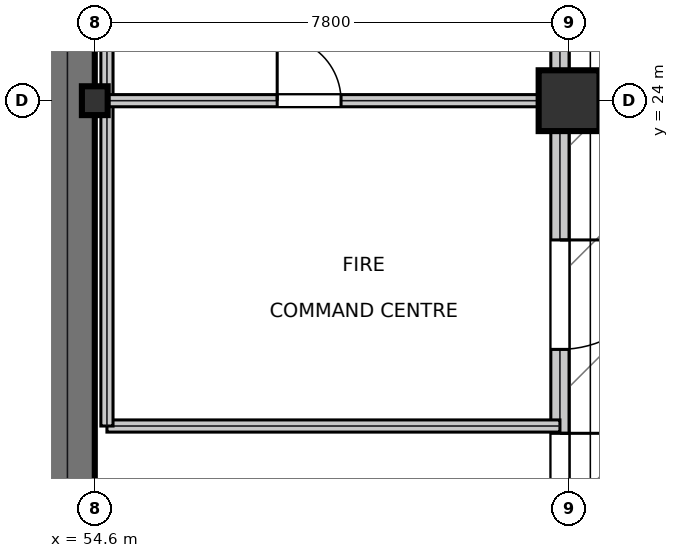
"""IFC4 building model, lengths in metres.
Left out: names, types, materials, properties, quantities, classifications, styles, units other than length and angle.
Written with IfcOpenShell. Run it as: python <this file> out.ifc"""

import sys

from ifc_helpers import new_model, si_unit, direction, frame, frame_2d, origin, origin_2d, place, context, subcontext, project, spatial, rectangle, i_section, extrude, element, fill, save


model = new_model("IFC4")
c1 = context("Model", 3, precision=1e-05, world=origin(), true_north=direction((0.0, 1.0)))
c2 = subcontext(c1, "Body", "Model", "MODEL_VIEW")
j1 = project(units=[si_unit("LENGTHUNIT", "METRE"), si_unit("PLANEANGLEUNIT", "RADIAN")], contexts=[c1])
p1 = place(None, origin())
s1 = spatial("IfcSite", under=j1, at=p1, CompositionType="ELEMENT")
p2 = place(p1, origin())
s2 = spatial("IfcBuilding", under=s1, at=p2, CompositionType="ELEMENT")
p3 = place(p2, origin())
s3 = spatial("IfcBuildingStorey", under=s2, at=p3, CompositionType="ELEMENT", Elevation=0.0)
p4 = place(p3, frame((54.15, 16.45, 0.0), z_axis=(0.0, 0.0, 1.0), x_axis=(0.0, 1.0, 0.0)))
e1 = element("IfcWall", 1, at=p4, inside=s3, PredefinedType="SHEAR", context=c2, shape_type="SweptSolid", body=[
    extrude(rectangle(XDim=15.1, YDim=0.9, at=frame_2d((7.55, 0.0))), origin(), (0.0, 0.0, 1.0), 5.12),
])
p5 = place(p3, frame((54.6, 24.0, 0.0), z_axis=(0.0, 0.0, 1.0), x_axis=(1.0, 0.0, 0.0)))
e2 = element("IfcColumn", 2, at=p5, inside=s3, PredefinedType="COLUMN", context=c2, shape_type="SweptSolid", body=[
    extrude(i_section(OverallWidth=0.424, OverallDepth=0.474, WebThickness=0.048, FlangeThickness=0.077, at=origin_2d()), origin(), (0.0, 0.0, 1.0), 5.395),
])
p6 = place(p3, frame((62.4, 24.0, 0.0), z_axis=(0.0, 0.0, 1.0), x_axis=(1.0, 0.0, 0.0)))
e3 = element("IfcColumn", 3, at=p6, inside=s3, PredefinedType="COLUMN", context=c2, shape_type="SweptSolid", body=[
    extrude(rectangle(XDim=1.0, YDim=1.0, at=origin_2d()), origin(), (0.0, 0.0, 1.0), 5.395),
])
p7 = place(p3, frame((62.25, 16.51, 0.0), z_axis=(0.0, 0.0, 1.0), x_axis=(0.0, 1.0, 0.0)))
e4 = element("IfcWall", 4, at=p7, inside=s3, PredefinedType="STANDARD", context=c2, shape_type="SweptSolid", body=[
    extrude(rectangle(XDim=6.98, YDim=0.3, at=frame_2d((3.49, 0.0))), origin(), (0.0, 0.0, 1.0), 4.648),
])
p8 = place(p7, frame((0.22, 0.0, 0.0)))
e5 = element("IfcOpeningElement", 5, at=p8, cuts=e4, PredefinedType="OPENING", context=c2, shape_type="SweptSolid", body=[
    extrude(rectangle(XDim=1.8, YDim=2.2, at=frame_2d((0.9, 1.1))), frame((0.0, 0.16, 0.0), z_axis=(0.0, -1.0, 0.0), x_axis=(1.0, 0.0, 0.0)), (0.0, 0.0, 1.0), 0.32),
])
p9 = place(p7, frame((3.4, 0.0, 0.0)))
e6 = element("IfcOpeningElement", 6, at=p9, cuts=e4, PredefinedType="OPENING", context=c2, shape_type="SweptSolid", body=[
    extrude(rectangle(XDim=1.8, YDim=2.2, at=frame_2d((0.9, 1.1))), frame((0.0, 0.16, 0.0), z_axis=(0.0, -1.0, 0.0), x_axis=(1.0, 0.0, 0.0)), (0.0, 0.0, 1.0), 0.32),
])
p10 = place(p3, frame((62.25, 24.51, 0.0), z_axis=(0.0, 0.0, 1.0), x_axis=(0.0, 1.0, 0.0)))
e7 = element("IfcWall", 7, at=p10, inside=s3, PredefinedType="STANDARD", context=c2, shape_type="SweptSolid", body=[
    extrude(rectangle(XDim=6.98, YDim=0.3, at=frame_2d((3.49, 0.0))), origin(), (0.0, 0.0, 1.0), 4.648),
])
p11 = place(p10, frame((4.55, 0.0, 0.0)))
e8 = element("IfcOpeningElement", 8, at=p11, cuts=e7, PredefinedType="OPENING", context=c2, shape_type="SweptSolid", body=[
    extrude(rectangle(XDim=1.8, YDim=2.2, at=frame_2d((0.9, 1.1))), frame((0.0, 0.16, 0.0), z_axis=(0.0, -1.0, 0.0), x_axis=(1.0, 0.0, 0.0)), (0.0, 0.0, 1.0), 0.32),
])
p12 = place(p3, frame((54.8, 18.65, 0.0), z_axis=(0.0, 0.0, 1.0), x_axis=(1.0, 0.0, 0.0)))
e9 = element("IfcWall", 9, at=p12, inside=s3, PredefinedType="SOLIDWALL", context=c2, shape_type="SweptSolid", body=[
    extrude(rectangle(XDim=7.45, YDim=0.2, at=frame_2d((3.725, 0.0))), origin(), (0.0, 0.0, 1.0), 5.12),
])
p13 = place(p3, frame((54.8, 18.65, 0.0), z_axis=(0.0, 0.0, 1.0), x_axis=(0.0, 1.0, 0.0)))
e10 = element("IfcWall", 10, at=p13, inside=s3, PredefinedType="SOLIDWALL", context=c2, shape_type="SweptSolid", body=[
    extrude(rectangle(XDim=9.95, YDim=0.2, at=frame_2d((4.975, 0.0))), origin(), (0.0, 0.0, 1.0), 4.338),
])
p14 = place(p3, frame((54.8, 24.0, 0.0), z_axis=(0.0, 0.0, 1.0), x_axis=(1.0, 0.0, 0.0)))
e11 = element("IfcWall", 11, at=p14, inside=s3, PredefinedType="SOLIDWALL", context=c2, shape_type="SweptSolid", body=[
    extrude(rectangle(XDim=7.45, YDim=0.2, at=frame_2d((3.725, 0.0))), origin(), (0.0, 0.0, 1.0), 4.338),
])
p15 = place(p14, frame((2.8, 0.0, 0.0)))
e12 = element("IfcOpeningElement", 12, at=p15, cuts=e11, PredefinedType="OPENING", context=c2, shape_type="SweptSolid", body=[
    extrude(rectangle(XDim=1.05, YDim=2.15, at=frame_2d((0.525, 1.075))), frame((0.0, 0.11, 0.0), z_axis=(0.0, -1.0, 0.0), x_axis=(1.0, 0.0, 0.0)), (0.0, 0.0, 1.0), 0.22),
])
p16 = place(p8, frame((1.8, 0.0, 0.0), z_axis=(0.0, 0.0, 1.0), x_axis=(-1.0, 0.0, 0.0)))
e13 = element("IfcDoor", 13, at=p16, inside=s3, OperationType="SINGLE_SWING_LEFT", PredefinedType="DOOR", context=c2, shape_type="SweptSolid", body=[
    extrude(rectangle(XDim=1.8, YDim=2.2, at=frame_2d((0.9, 1.1))), frame((0.0, 0.025, 0.0), z_axis=(0.0, -1.0, 0.0), x_axis=(1.0, 0.0, 0.0)), (0.0, 0.0, 1.0), 0.05),
])
fill(e5, e13)
p17 = place(p9, frame((1.8, 0.0, 0.0), z_axis=(0.0, 0.0, 1.0), x_axis=(-1.0, 0.0, 0.0)))
e14 = element("IfcDoor", 14, at=p17, inside=s3, OperationType="SINGLE_SWING_LEFT", PredefinedType="DOOR", context=c2, shape_type="SweptSolid", body=[
    extrude(rectangle(XDim=1.8, YDim=2.2, at=frame_2d((0.9, 1.1))), frame((0.0, 0.025, 0.0), z_axis=(0.0, -1.0, 0.0), x_axis=(1.0, 0.0, 0.0)), (0.0, 0.0, 1.0), 0.05),
])
fill(e6, e14)
p18 = place(p15, origin())
e15 = element("IfcDoor", 15, at=p18, inside=s3, OperationType="SINGLE_SWING_LEFT", PredefinedType="DOOR", context=c2, shape_type="SweptSolid", body=[
    extrude(rectangle(XDim=1.05, YDim=2.15, at=frame_2d((0.525, 1.075))), frame((0.0, 0.025, 0.0), z_axis=(0.0, -1.0, 0.0), x_axis=(1.0, 0.0, 0.0)), (0.0, 0.0, 1.0), 0.05),
])
fill(e12, e15)
save(model, sys.argv[1])
